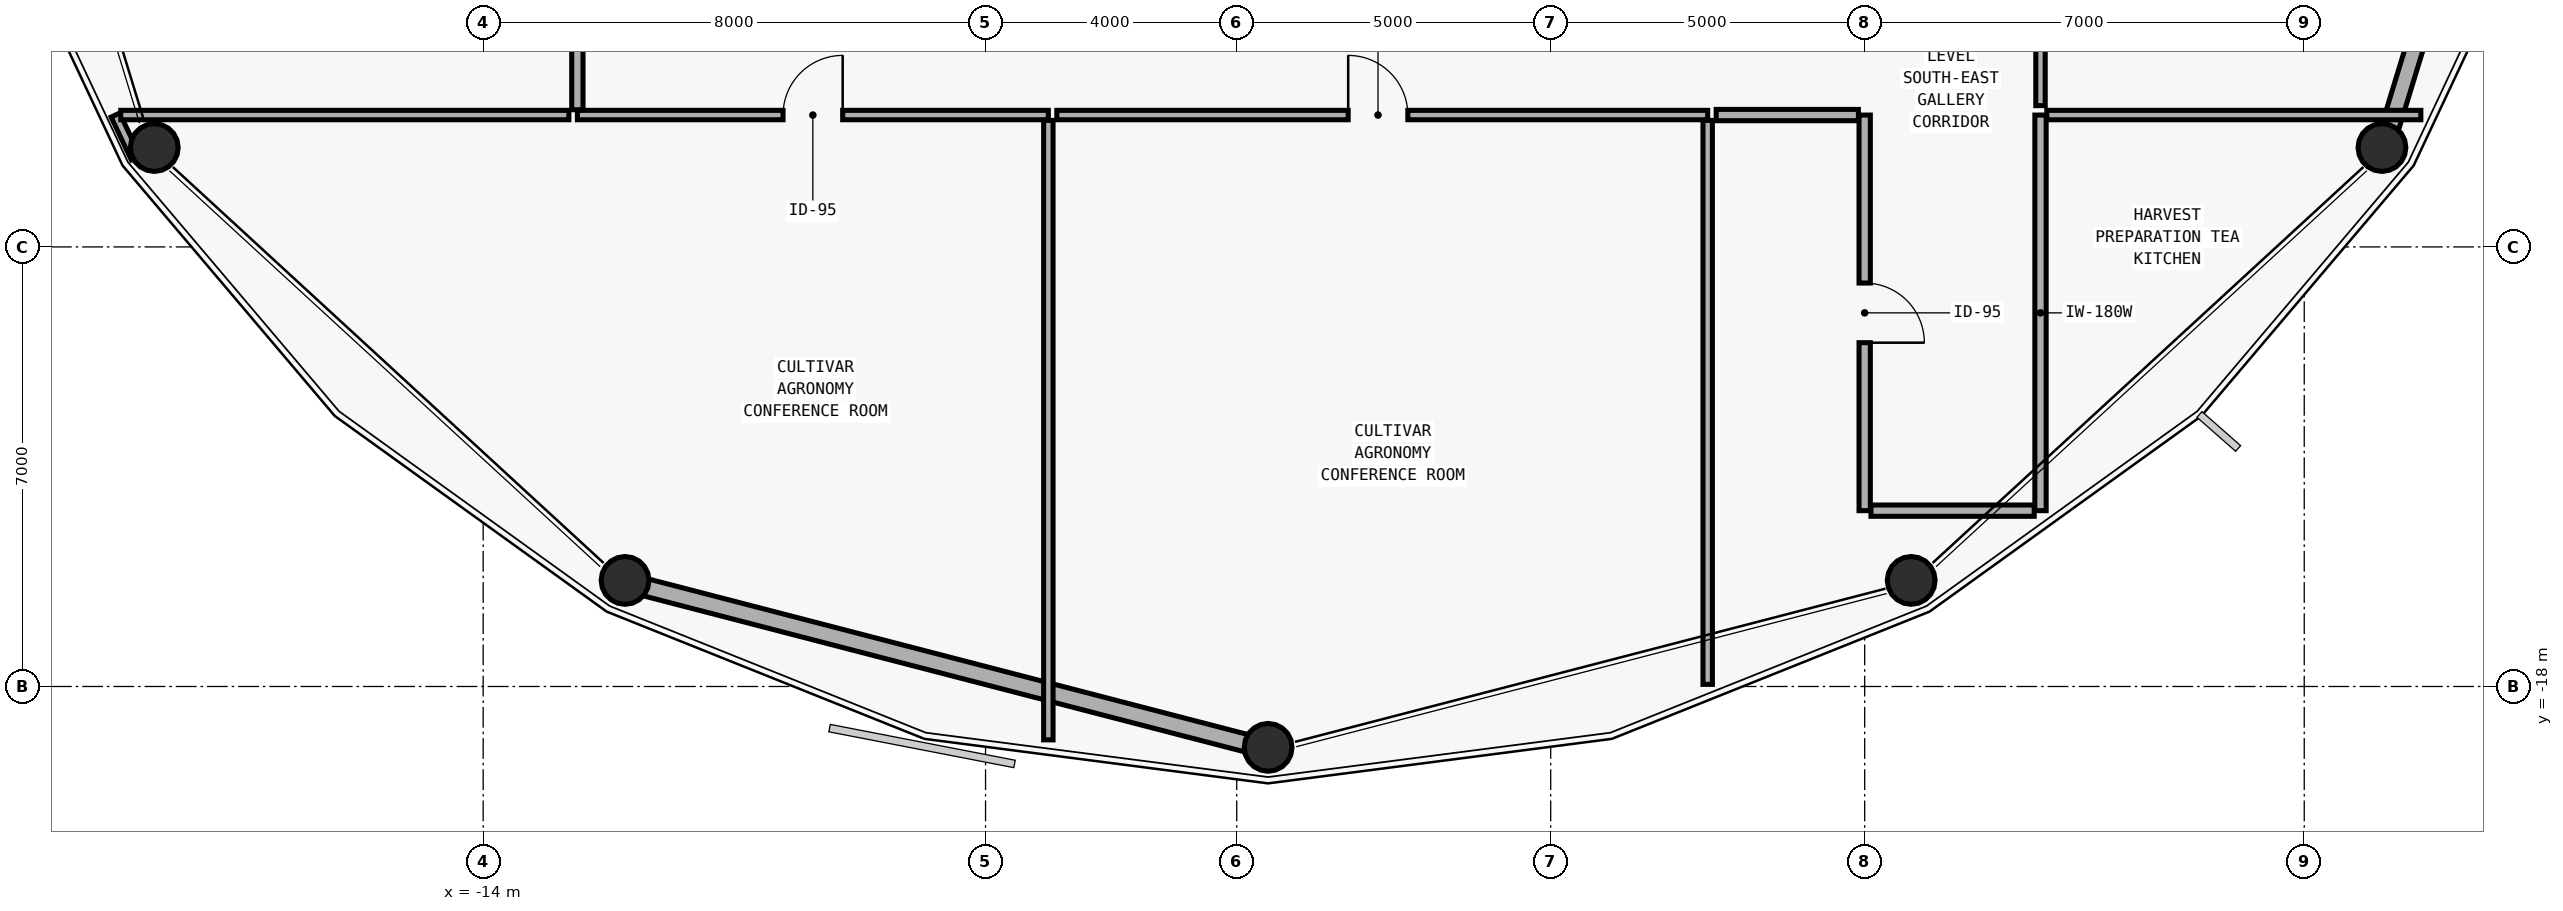
"""IFC4 building model, lengths in metres.
Left out: names, types, materials, properties, quantities, classifications, styles, units other than length and angle.
Written with IfcOpenShell. Run it as: python <this file> out.ifc"""

import sys

from ifc_helpers import new_model, si_unit, direction, frame, frame_2d, origin, origin_2d, place, context, subcontext, project, spatial, rectangle, hollow_circle, extrude, element, fill, save


model = new_model("IFC4")
c1 = context("Model", 3, precision=1e-05, world=origin(), true_north=direction((0.0, 1.0)))
c2 = subcontext(c1, "Body", "Model", "MODEL_VIEW")
j1 = project(units=[si_unit("LENGTHUNIT", "METRE"), si_unit("PLANEANGLEUNIT", "RADIAN")], contexts=[c1])
p1 = place(None, origin())
s1 = spatial("IfcSite", under=j1, at=p1, CompositionType="ELEMENT")
p2 = place(p1, origin())
s2 = spatial("IfcBuilding", under=s1, at=p2, CompositionType="ELEMENT")
p3 = place(p2, frame((0.0, 0.0, 157.8)))
s3 = spatial("IfcBuildingStorey", under=s2, at=p3, CompositionType="ELEMENT", Elevation=157.8)
for number, where, z_axis, x_axis in (
    (1, (-19.267, -9.429, 0.0), (0.015, 0.006, 1.0), (-0.381, 0.925, 0.0)),
    (2, (-11.758, -16.332, 0.0), (0.009, 0.011, 1.0), (-0.78, 0.625, 0.0)),
):
    element("IfcColumn", number, at=place(p3, frame(where, z_axis=z_axis, x_axis=x_axis)), inside=s3, PredefinedType="COLUMN", context=c2, shape_type="SweptSolid", body=[
        extrude(hollow_circle(Radius=0.381, WallThickness=0.028, at=origin_2d()), origin(), (0.0, 0.0, 1.0), 3.875),
    ])
p4 = place(p3, frame((-1.5, -18.993, 0.0), z_axis=(0.0, 0.012347848881, 0.999923762408), x_axis=(-1.0, 0.0, 0.0)))
e3 = element("IfcColumn", 3, at=p4, inside=s3, PredefinedType="COLUMN", context=c2, shape_type="SweptSolid", body=[
    extrude(hollow_circle(Radius=0.381, WallThickness=0.028, at=origin_2d()), origin(), (0.0, 0.0, 1.0), 3.875),
])
for number, where, z_axis, x_axis in (
    (4, (8.758, -16.332, 0.0), (-0.009, 0.011, 1.0), (-0.78, -0.625, 0.0)),
    (5, (16.267, -9.429, 0.0), (-0.015, 0.006, 1.0), (-0.381, -0.925, 0.0)),
):
    element("IfcColumn", number, at=place(p3, frame(where, z_axis=z_axis, x_axis=x_axis)), inside=s3, PredefinedType="COLUMN", context=c2, shape_type="SweptSolid", body=[
        extrude(hollow_circle(Radius=0.381, WallThickness=0.028, at=origin_2d()), origin(), (0.0, 0.0, 1.0), 3.875),
    ])
p5 = place(p3, frame((-1.825, -18.909, 0.0), z_axis=(0.0, 0.0, 1.0), x_axis=(-0.967949740491, 0.251143982374, 0.0)))
e6 = element("IfcWall", 6, at=p5, inside=s3, PredefinedType="SOLIDWALL", context=c2, shape_type="SweptSolid", body=[
    extrude(rectangle(XDim=9.925, YDim=0.28, at=frame_2d((4.963, 0.0))), origin(), (0.0, 0.0, 1.0), 3.16),
])
p6 = place(p3, frame((19.052, -0.321, 0.0), z_axis=(0.0, 0.0, 1.0), x_axis=(-0.292446025951, -0.956282030525, 0.0)))
e7 = element("IfcWall", 7, at=p6, inside=s3, PredefinedType="SOLIDWALL", context=c2, shape_type="SweptSolid", body=[
    extrude(rectangle(XDim=9.188, YDim=0.28, at=frame_2d((4.594, 0.0))), origin(), (0.0, 0.0, 1.0), 3.16),
])
p7 = place(p3, frame((-12.5, -8.9, 0.0), z_axis=(0.0, 0.0, 1.0), x_axis=(1.0, 0.0, 0.0)))
e8 = element("IfcWall", 8, at=p7, inside=s3, PredefinedType="PARTITIONING", context=c2, shape_type="SweptSolid", body=[
    extrude(rectangle(XDim=7.5, YDim=0.15, at=frame_2d((3.75, 0.0))), origin(), (0.0, 0.0, 1.0), 3.072),
])
p8 = place(p7, frame((3.275, 0.0, 0.0)))
e9 = element("IfcOpeningElement", 9, at=p8, cuts=e8, PredefinedType="OPENING", context=c2, shape_type="SweptSolid", body=[
    extrude(rectangle(XDim=0.95, YDim=2.1, at=frame_2d((0.475, 1.05))), frame((0.0, 0.085, 0.0), z_axis=(0.0, -1.0, 0.0), x_axis=(1.0, 0.0, 0.0)), (0.0, 0.0, 1.0), 0.17),
])
p9 = place(p3, frame((-4.865, -8.9, 0.0), z_axis=(0.0, 0.0, 1.0), x_axis=(1.0, 0.0, 0.0)))
e10 = element("IfcWall", 10, at=p9, inside=s3, PredefinedType="PARTITIONING", context=c2, shape_type="SweptSolid", body=[
    extrude(rectangle(XDim=10.365, YDim=0.15, at=frame_2d((5.183, 0.0))), origin(), (0.0, 0.0, 1.0), 3.64),
])
p10 = place(p9, frame((4.64, 0.0, 0.0)))
e11 = element("IfcOpeningElement", 11, at=p10, cuts=e10, PredefinedType="OPENING", context=c2, shape_type="SweptSolid", body=[
    extrude(rectangle(XDim=0.95, YDim=2.1, at=frame_2d((0.475, 1.05))), frame((0.0, 0.085, 0.0), z_axis=(0.0, -1.0, 0.0), x_axis=(1.0, 0.0, 0.0)), (0.0, 0.0, 1.0), 0.17),
])
p11 = place(p3, frame((8.0, -8.9, 0.0), z_axis=(0.0, 0.0, 1.0), x_axis=(0.0, -1.0, 0.0)))
e12 = element("IfcWall", 12, at=p11, inside=s3, PredefinedType="PLUMBINGWALL", context=c2, shape_type="SweptSolid", body=[
    extrude(rectangle(XDim=6.3, YDim=0.18, at=frame_2d((3.15, 0.0))), origin(), (0.0, 0.0, 1.0), 3.072),
])
p12 = place(p11, frame((2.675, 0.0, 0.0)))
e13 = element("IfcOpeningElement", 13, at=p12, cuts=e12, PredefinedType="OPENING", context=c2, shape_type="SweptSolid", body=[
    extrude(rectangle(XDim=0.95, YDim=2.1, at=frame_2d((0.475, 1.05))), frame((0.0, 0.1, 0.0), z_axis=(0.0, -1.0, 0.0), x_axis=(1.0, 0.0, 0.0)), (0.0, 0.0, 1.0), 0.2),
])
p13 = place(p3, frame((-5.0, -8.985, 0.0), z_axis=(0.0, 0.0, 1.0), x_axis=(0.0, -1.0, 0.0)))
e14 = element("IfcWall", 14, at=p13, inside=s3, PredefinedType="PARTITIONING", context=c2, shape_type="SweptSolid", body=[
    extrude(rectangle(XDim=9.865, YDim=0.15, at=frame_2d((4.933, 0.0))), origin(), (0.0, 0.0, 1.0), 3.64),
])
p14 = place(p3, frame((-19.535, -9.584, 0.0), z_axis=(0.0, 0.0, 1.0), x_axis=(-0.425905886424, 0.90476747063, 0.0)))
e15 = element("IfcWall", 15, at=p14, inside=s3, PredefinedType="PARTITIONING", context=c2, shape_type="SweptSolid", body=[
    extrude(rectangle(XDim=0.756, YDim=0.15, at=frame_2d((0.378, 0.0))), origin(), (0.0, 0.0, 1.0), 3.172),
])
p15 = place(p3, frame((-19.772, -8.9, 0.0), z_axis=(0.0, 0.0, 1.0), x_axis=(1.0, 0.0, 0.0)))
e16 = element("IfcWall", 16, at=p15, inside=s3, PredefinedType="PARTITIONING", context=c2, shape_type="SweptSolid", body=[
    extrude(rectangle(XDim=7.137, YDim=0.15, at=frame_2d((3.568, 0.0))), origin(), (0.0, 0.0, 1.0), 3.072),
])
p16 = place(p3, frame((5.5, -8.985, 0.0), z_axis=(0.0, 0.0, 1.0), x_axis=(0.0, -1.0, 0.0)))
e17 = element("IfcWall", 17, at=p16, inside=s3, PredefinedType="PARTITIONING", context=c2, shape_type="SweptSolid", body=[
    extrude(rectangle(XDim=8.981, YDim=0.15, at=frame_2d((4.49, 0.0))), origin(), (0.0, 0.0, 1.0), 3.64),
])
p17 = place(p3, frame((10.8, -15.2, 0.0), z_axis=(0.0, 0.0, 1.0), x_axis=(0.0, 1.0, 0.0)))
e18 = element("IfcWall", 18, at=p17, inside=s3, PredefinedType="PLUMBINGWALL", context=c2, shape_type="SweptSolid", body=[
    extrude(rectangle(XDim=6.3, YDim=0.18, at=frame_2d((3.15, 0.0))), origin(), (0.0, 0.0, 1.0), 3.64),
])
p18 = place(p3, frame((8.1, -15.2, 0.0), z_axis=(0.0, 0.0, 1.0), x_axis=(1.0, 0.0, 0.0)))
e19 = element("IfcWall", 19, at=p18, inside=s3, PredefinedType="PLUMBINGWALL", context=c2, shape_type="SweptSolid", body=[
    extrude(rectangle(XDim=2.6, YDim=0.18, at=frame_2d((1.3, 0.0))), origin(), (0.0, 0.0, 1.0), 3.64),
])
p19 = place(p3, frame((5.635, -8.9, 0.0), z_axis=(0.0, 0.0, 1.0), x_axis=(1.0, 0.0, 0.0)))
e20 = element("IfcWall", 20, at=p19, inside=s3, PredefinedType="PLUMBINGWALL", context=c2, shape_type="SweptSolid", body=[
    extrude(rectangle(XDim=2.265, YDim=0.18, at=frame_2d((1.132, 0.0))), origin(), (0.0, 0.0, 1.0), 3.64),
])
p20 = place(p3, frame((10.9, -8.9, 0.0), z_axis=(0.0, 0.0, 1.0), x_axis=(1.0, 0.0, 0.0)))
e21 = element("IfcWall", 21, at=p20, inside=s3, PredefinedType="PARTITIONING", context=c2, shape_type="SweptSolid", body=[
    extrude(rectangle(XDim=5.957, YDim=0.15, at=frame_2d((2.979, 0.0))), origin(), (0.0, 0.0, 1.0), 3.072),
])
p21 = place(p3, frame((-12.5, -6.7, 0.0), z_axis=(0.0, 0.0, 1.0), x_axis=(0.0, -1.0, 0.0)))
e22 = element("IfcWall", 22, at=p21, inside=s3, PredefinedType="PLUMBINGWALL", context=c2, shape_type="SweptSolid", body=[
    extrude(rectangle(XDim=2.115, YDim=0.18, at=frame_2d((1.058, 0.0))), origin(), (0.0, 0.0, 1.0), 3.64),
])
p22 = place(p3, frame((10.8, -8.75, 0.0), z_axis=(0.0, 0.0, 1.0), x_axis=(0.0, 1.0, 0.0)))
e23 = element("IfcWall", 23, at=p22, inside=s3, PredefinedType="PARTITIONING", context=c2, shape_type="SweptSolid", body=[
    extrude(rectangle(XDim=2.015, YDim=0.15, at=frame_2d((1.007, 0.0))), origin(), (0.0, 0.0, 1.0), 3.64),
])
p23 = place(p8, origin())
e24 = element("IfcDoor", 24, at=p23, inside=s3, OperationType="SINGLE_SWING_RIGHT", PredefinedType="DOOR", context=c2, shape_type="SweptSolid", body=[
    extrude(rectangle(XDim=0.95, YDim=2.1, at=frame_2d((0.475, 1.05))), frame((0.0, 0.025, 0.0), z_axis=(0.0, -1.0, 0.0), x_axis=(1.0, 0.0, 0.0)), (0.0, 0.0, 1.0), 0.05),
])
fill(e9, e24)
p24 = place(p10, origin())
e25 = element("IfcDoor", 25, at=p24, inside=s3, OperationType="SINGLE_SWING_LEFT", PredefinedType="DOOR", context=c2, shape_type="SweptSolid", body=[
    extrude(rectangle(XDim=0.95, YDim=2.1, at=frame_2d((0.475, 1.05))), frame((0.0, 0.025, 0.0), z_axis=(0.0, -1.0, 0.0), x_axis=(1.0, 0.0, 0.0)), (0.0, 0.0, 1.0), 0.05),
])
fill(e11, e25)
p25 = place(p12, origin())
e26 = element("IfcDoor", 26, at=p25, inside=s3, OperationType="SINGLE_SWING_RIGHT", PredefinedType="DOOR", context=c2, shape_type="SweptSolid", body=[
    extrude(rectangle(XDim=0.95, YDim=2.1, at=frame_2d((0.475, 1.05))), frame((0.0, 0.025, 0.0), z_axis=(0.0, -1.0, 0.0), x_axis=(1.0, 0.0, 0.0)), (0.0, 0.0, 1.0), 0.05),
])
fill(e13, e26)
save(model, sys.argv[1])
